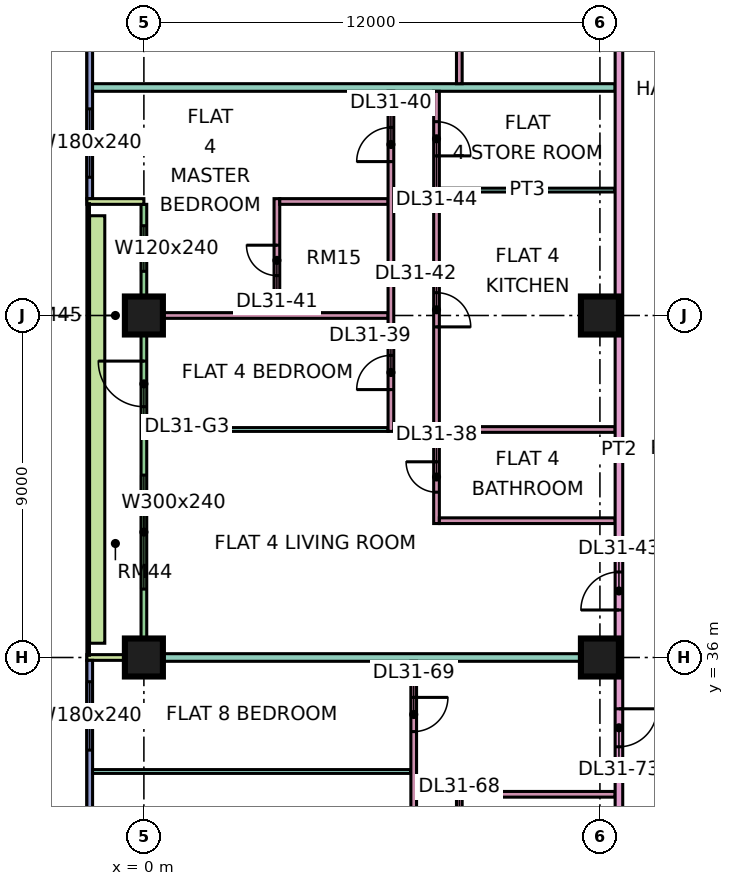
"""IFC4 building model, lengths in metres.
Left out: names, types, materials, properties, quantities, classifications, styles, units other than length and angle.
Written with IfcOpenShell. Run it as: python <this file> out.ifc"""

import sys

from ifc_helpers import new_model, si_unit, direction, frame, frame_2d, origin, origin_2d, place, context, subcontext, project, spatial, rectangle, extrude, element, fill, save


model = new_model("IFC4")
c1 = context("Model", 3, precision=1e-05, world=origin(), true_north=direction((0.0, 1.0)))
c2 = subcontext(c1, "Body", "Model", "MODEL_VIEW")
j1 = project(units=[si_unit("LENGTHUNIT", "METRE"), si_unit("PLANEANGLEUNIT", "RADIAN")], contexts=[c1])
p1 = place(None, origin())
s1 = spatial("IfcSite", under=j1, at=p1, CompositionType="ELEMENT")
p2 = place(p1, origin())
s2 = spatial("IfcBuilding", under=s1, at=p2, CompositionType="ELEMENT")
p3 = place(p2, frame((0.0, 0.0, 133.15)))
s3 = spatial("IfcBuildingStorey", under=s2, at=p3, CompositionType="ELEMENT", Elevation=133.15)
p4 = place(p3, frame((0.0, 36.0, 0.0), z_axis=(0.0, 0.0, 1.0), x_axis=(1.0, 0.0, 0.0)))
e1 = element("IfcColumn", 1, at=p4, inside=s3, PredefinedType="COLUMN", context=c2, shape_type="SweptSolid", body=[
    extrude(rectangle(XDim=1.0, YDim=1.0, at=origin_2d()), origin(), (0.0, 0.0, 1.0), 3.75),
])
for number, where, z_axis, x_axis in (
    (2, (0.0, 45.0, 0.0), (0.0, 0.0, 1.0), (1.0, 0.0, 0.0)),
    (3, (12.0, 36.0, 0.0), (0.0, 0.0, 1.0), (1.0, 0.0, 0.0)),
    (4, (12.0, 45.0, 0.0), (0.0, 0.0, 1.0), (1.0, 0.0, 0.0)),
):
    element("IfcColumn", number, at=place(p3, frame(where, z_axis=z_axis, x_axis=x_axis)), inside=s3, PredefinedType="COLUMN", context=c2, shape_type="SweptSolid", body=[
        extrude(rectangle(XDim=1.0, YDim=1.0, at=origin_2d()), origin(), (0.0, 0.0, 1.0), 3.75),
    ])
p5 = place(p3, frame((-1.425, 61.5, 0.0), z_axis=(0.0, 0.0, 1.0), x_axis=(0.0, -1.0, 0.0)))
e5 = element("IfcWall", 5, at=p5, inside=s3, PredefinedType="SOLIDWALL", context=c2, shape_type="SweptSolid", body=[
    extrude(rectangle(XDim=13.425, YDim=0.15, at=frame_2d((6.712, 0.0))), origin(), (0.0, 0.0, 1.0), 3.35),
])
p6 = place(p5, frame((0.75, 0.0, 0.45)))
e6 = element("IfcOpeningElement", 6, at=p6, cuts=e5, PredefinedType="OPENING", context=c2, shape_type="SweptSolid", body=[
    extrude(rectangle(XDim=3.0, YDim=2.4, at=frame_2d((1.5, 1.2))), frame((0.0, 0.085, 0.0), z_axis=(0.0, -1.0, 0.0), x_axis=(1.0, 0.0, 0.0)), (0.0, 0.0, 1.0), 0.17),
])
p7 = place(p5, frame((6.0, 0.0, 0.45)))
e7 = element("IfcOpeningElement", 7, at=p7, cuts=e5, PredefinedType="OPENING", context=c2, shape_type="SweptSolid", body=[
    extrude(rectangle(XDim=3.0, YDim=2.4, at=frame_2d((1.5, 1.2))), frame((0.0, 0.085, 0.0), z_axis=(0.0, -1.0, 0.0), x_axis=(1.0, 0.0, 0.0)), (0.0, 0.0, 1.0), 0.17),
])
p8 = place(p5, frame((11.062, 0.0, 0.45)))
e8 = element("IfcOpeningElement", 8, at=p8, cuts=e5, PredefinedType="OPENING", context=c2, shape_type="SweptSolid", body=[
    extrude(rectangle(XDim=1.8, YDim=2.4, at=frame_2d((0.9, 1.2))), frame((0.0, 0.085, 0.0), z_axis=(0.0, -1.0, 0.0), x_axis=(1.0, 0.0, 0.0)), (0.0, 0.0, 1.0), 0.17),
])
p9 = place(p3, frame((0.0, 47.925, 0.0), z_axis=(0.0, 0.0, 1.0), x_axis=(0.0, -1.0, 0.0)))
e9 = element("IfcWall", 9, at=p9, inside=s3, PredefinedType="SOLIDWALL", context=c2, shape_type="SweptSolid", body=[
    extrude(rectangle(XDim=11.85, YDim=0.15, at=frame_2d((5.925, 0.0))), origin(), (0.0, 0.0, 1.0), 3.35),
])
p10 = place(p9, frame((0.562, 0.0, 0.45)))
e10 = element("IfcOpeningElement", 10, at=p10, cuts=e9, PredefinedType="OPENING", context=c2, shape_type="SweptSolid", body=[
    extrude(rectangle(XDim=1.2, YDim=2.4, at=frame_2d((0.6, 1.2))), frame((0.0, 0.085, 0.0), z_axis=(0.0, -1.0, 0.0), x_axis=(1.0, 0.0, 0.0)), (0.0, 0.0, 1.0), 0.17),
])
p11 = place(p9, frame((4.125, 0.0, 0.0)))
e11 = element("IfcOpeningElement", 11, at=p11, cuts=e9, PredefinedType="OPENING", context=c2, shape_type="SweptSolid", body=[
    extrude(rectangle(XDim=1.2, YDim=2.4, at=frame_2d((0.6, 1.2))), frame((0.0, 0.085, 0.0), z_axis=(0.0, -1.0, 0.0), x_axis=(1.0, 0.0, 0.0)), (0.0, 0.0, 1.0), 0.17),
])
p12 = place(p9, frame((7.125, 0.0, 0.45)))
e12 = element("IfcOpeningElement", 12, at=p12, cuts=e9, PredefinedType="OPENING", context=c2, shape_type="SweptSolid", body=[
    extrude(rectangle(XDim=3.0, YDim=2.4, at=frame_2d((1.5, 1.2))), frame((0.0, 0.085, 0.0), z_axis=(0.0, -1.0, 0.0), x_axis=(1.0, 0.0, 0.0)), (0.0, 0.0, 1.0), 0.17),
])
for number, where, z_axis, x_axis in (
    (13, (-1.5, 48.0, 0.0), (0.0, 0.0, 1.0), (1.0, 0.0, 0.0)),
    (14, (-1.5, 36.0, 0.0), (0.0, 0.0, 1.0), (1.0, 0.0, 0.0)),
):
    element("IfcWall", number, at=place(p3, frame(where, z_axis=z_axis, x_axis=x_axis)), inside=s3, PredefinedType="SOLIDWALL", context=c2, shape_type="SweptSolid", body=[
        extrude(rectangle(XDim=1.5, YDim=0.15, at=frame_2d((0.75, 0.0))), origin(), (0.0, 0.0, 1.0), 3.35),
    ])
p13 = place(p3, frame((-1.425, 35.925, 0.0), z_axis=(0.0, 0.0, 1.0), x_axis=(0.0, -1.0, 0.0)))
e15 = element("IfcWall", 15, at=p13, inside=s3, PredefinedType="SOLIDWALL", context=c2, shape_type="SweptSolid", body=[
    extrude(rectangle(XDim=11.85, YDim=0.15, at=frame_2d((5.925, 0.0))), origin(), (0.0, 0.0, 1.0), 3.35),
])
p14 = place(p13, frame((0.562, 0.0, 0.45)))
e16 = element("IfcOpeningElement", 16, at=p14, cuts=e15, PredefinedType="OPENING", context=c2, shape_type="SweptSolid", body=[
    extrude(rectangle(XDim=1.8, YDim=2.4, at=frame_2d((0.9, 1.2))), frame((0.0, 0.085, 0.0), z_axis=(0.0, -1.0, 0.0), x_axis=(1.0, 0.0, 0.0)), (0.0, 0.0, 1.0), 0.17),
])
p15 = place(p13, frame((4.425, 0.0, 0.45)))
e17 = element("IfcOpeningElement", 17, at=p15, cuts=e15, PredefinedType="OPENING", context=c2, shape_type="SweptSolid", body=[
    extrude(rectangle(XDim=3.0, YDim=2.4, at=frame_2d((1.5, 1.2))), frame((0.0, 0.085, 0.0), z_axis=(0.0, -1.0, 0.0), x_axis=(1.0, 0.0, 0.0)), (0.0, 0.0, 1.0), 0.17),
])
p16 = place(p13, frame((9.488, 0.0, 0.45)))
e18 = element("IfcOpeningElement", 18, at=p16, cuts=e15, PredefinedType="OPENING", context=c2, shape_type="SweptSolid", body=[
    extrude(rectangle(XDim=1.8, YDim=2.4, at=frame_2d((0.9, 1.2))), frame((0.0, 0.085, 0.0), z_axis=(0.0, -1.0, 0.0), x_axis=(1.0, 0.0, 0.0)), (0.0, 0.0, 1.0), 0.17),
])
p17 = place(p3, frame((-1.229, 47.625, 0.0), z_axis=(0.0, 0.0, 1.0), x_axis=(0.0, -1.0, 0.0)))
e19 = element("IfcWall", 19, at=p17, inside=s3, PredefinedType="SOLIDWALL", context=c2, shape_type="SweptSolid", body=[
    extrude(rectangle(XDim=11.25, YDim=0.4, at=frame_2d((5.625, 0.0))), origin(), (0.0, 0.0, 1.0), 0.7),
])
p18 = place(p3, frame((-1.351, 33.0, 0.0), z_axis=(0.0, 0.0, 1.0), x_axis=(1.0, 0.0, 0.0)))
e20 = element("IfcWall", 20, at=p18, inside=s3, PredefinedType="PARTITIONING", context=c2, shape_type="SweptSolid", body=[
    extrude(rectangle(XDim=8.376, YDim=0.1, at=frame_2d((4.188, 0.0))), origin(), (0.0, 0.0, 1.0), 3.35),
])
e21 = element("IfcWall", 21, at=p4, inside=s3, PredefinedType="PARTITIONING", context=c2, shape_type="SweptSolid", body=[
    extrude(rectangle(XDim=12.4, YDim=0.2, at=frame_2d((6.2, 0.0))), origin(), (0.0, 0.0, 1.0), 3.35),
])
p19 = place(p3, frame((-1.35, 51.0, 0.0), z_axis=(0.0, 0.0, 1.0), x_axis=(1.0, 0.0, 0.0)))
e22 = element("IfcWall", 22, at=p19, inside=s3, PredefinedType="PARTITIONING", context=c2, shape_type="SweptSolid", body=[
    extrude(rectangle(XDim=13.75, YDim=0.2, at=frame_2d((6.875, 0.0))), origin(), (0.0, 0.0, 1.0), 3.35),
])
p20 = place(p3, frame((0.074, 42.0, 0.0), z_axis=(0.0, 0.0, 1.0), x_axis=(1.0, 0.0, 0.0)))
e23 = element("IfcWall", 23, at=p20, inside=s3, PredefinedType="PARTITIONING", context=c2, shape_type="SweptSolid", body=[
    extrude(rectangle(XDim=6.351, YDim=0.1, at=frame_2d((3.176, 0.0))), origin(), (0.0, 0.0, 1.0), 3.35),
])
p21 = place(p3, frame((0.074, 45.0, 0.0), z_axis=(0.0, 0.0, 1.0), x_axis=(1.0, 0.0, 0.0)))
e24 = element("IfcWall", 24, at=p21, inside=s3, PredefinedType="PARTITIONING", context=c2, shape_type="SweptSolid", body=[
    extrude(rectangle(XDim=6.351, YDim=0.15, at=frame_2d((3.176, 0.0))), origin(), (0.0, 0.0, 1.0), 3.35),
])
p22 = place(p3, frame((3.5, 45.075, 0.0), z_axis=(0.0, 0.0, 1.0), x_axis=(0.0, 1.0, 0.0)))
e25 = element("IfcWall", 25, at=p22, inside=s3, PredefinedType="PARTITIONING", context=c2, shape_type="SweptSolid", body=[
    extrude(rectangle(XDim=3.0, YDim=0.15, at=frame_2d((1.5, 0.0))), origin(), (0.0, 0.0, 1.0), 3.35),
])
p23 = place(p22, frame((0.975, 0.0, 0.0)))
e26 = element("IfcOpeningElement", 26, at=p23, cuts=e25, PredefinedType="OPENING", context=c2, shape_type="SweptSolid", body=[
    extrude(rectangle(XDim=0.8, YDim=2.1, at=frame_2d((0.4, 1.05))), frame((0.0, 0.085, 0.0), z_axis=(0.0, -1.0, 0.0), x_axis=(1.0, 0.0, 0.0)), (0.0, 0.0, 1.0), 0.17),
])
p24 = place(p3, frame((3.575, 48.0, 0.0), z_axis=(0.0, 0.0, 1.0), x_axis=(1.0, 0.0, 0.0)))
e27 = element("IfcWall", 27, at=p24, inside=s3, PredefinedType="PARTITIONING", context=c2, shape_type="SweptSolid", body=[
    extrude(rectangle(XDim=2.85, YDim=0.15, at=frame_2d((1.425, 0.0))), origin(), (0.0, 0.0, 1.0), 3.35),
])
p25 = place(p3, frame((6.5, 41.95, 0.0), z_axis=(0.0, 0.0, 1.0), x_axis=(0.0, 1.0, 0.0)))
e28 = element("IfcWall", 28, at=p25, inside=s3, PredefinedType="PARTITIONING", context=c2, shape_type="SweptSolid", body=[
    extrude(rectangle(XDim=8.95, YDim=0.15, at=frame_2d((4.475, 0.0))), origin(), (0.0, 0.0, 1.0), 3.35),
])
p26 = place(p25, frame((1.1, 0.0, 0.0)))
e29 = element("IfcOpeningElement", 29, at=p26, cuts=e28, PredefinedType="OPENING", context=c2, shape_type="SweptSolid", body=[
    extrude(rectangle(XDim=0.9, YDim=2.1, at=frame_2d((0.45, 1.05))), frame((0.0, 0.085, 0.0), z_axis=(0.0, -1.0, 0.0), x_axis=(1.0, 0.0, 0.0)), (0.0, 0.0, 1.0), 0.17),
])
p27 = place(p25, frame((7.1, 0.0, 0.0)))
e30 = element("IfcOpeningElement", 30, at=p27, cuts=e28, PredefinedType="OPENING", context=c2, shape_type="SweptSolid", body=[
    extrude(rectangle(XDim=0.9, YDim=2.1, at=frame_2d((0.45, 1.05))), frame((0.0, 0.085, 0.0), z_axis=(0.0, -1.0, 0.0), x_axis=(1.0, 0.0, 0.0)), (0.0, 0.0, 1.0), 0.17),
])
p28 = place(p3, frame((7.1, 26.925, 0.0), z_axis=(0.0, 0.0, 1.0), x_axis=(0.0, 1.0, 0.0)))
e31 = element("IfcWall", 31, at=p28, inside=s3, PredefinedType="PARTITIONING", context=c2, shape_type="SweptSolid", body=[
    extrude(rectangle(XDim=8.975, YDim=0.15, at=frame_2d((4.487, 0.0))), origin(), (0.0, 0.0, 1.0), 3.35),
])
p29 = place(p28, frame((7.125, 0.0, 0.0)))
e32 = element("IfcOpeningElement", 32, at=p29, cuts=e31, PredefinedType="OPENING", context=c2, shape_type="SweptSolid", body=[
    extrude(rectangle(XDim=0.9, YDim=2.1, at=frame_2d((0.45, 1.05))), frame((0.0, 0.085, 0.0), z_axis=(0.0, -1.0, 0.0), x_axis=(1.0, 0.0, 0.0)), (0.0, 0.0, 1.0), 0.17),
])
p30 = place(p28, frame((4.125, 0.0, 0.0)))
e33 = element("IfcOpeningElement", 33, at=p30, cuts=e31, PredefinedType="OPENING", context=c2, shape_type="SweptSolid", body=[
    extrude(rectangle(XDim=0.9, YDim=2.1, at=frame_2d((0.45, 1.05))), frame((0.0, 0.085, 0.0), z_axis=(0.0, -1.0, 0.0), x_axis=(1.0, 0.0, 0.0)), (0.0, 0.0, 1.0), 0.17),
])
p31 = place(p3, frame((7.7, 39.525, 0.0), z_axis=(0.0, 0.0, 1.0), x_axis=(0.0, 1.0, 0.0)))
e34 = element("IfcWall", 34, at=p31, inside=s3, PredefinedType="PARTITIONING", context=c2, shape_type="SweptSolid", body=[
    extrude(rectangle(XDim=11.375, YDim=0.15, at=frame_2d((5.688, 0.0))), origin(), (0.0, 0.0, 1.0), 3.35),
])
p32 = place(p31, frame((0.825, 0.0, 0.0)))
e35 = element("IfcOpeningElement", 35, at=p32, cuts=e34, PredefinedType="OPENING", context=c2, shape_type="SweptSolid", body=[
    extrude(rectangle(XDim=0.8, YDim=2.1, at=frame_2d((0.4, 1.05))), frame((0.0, 0.085, 0.0), z_axis=(0.0, -1.0, 0.0), x_axis=(1.0, 0.0, 0.0)), (0.0, 0.0, 1.0), 0.17),
])
p33 = place(p31, frame((5.175, 0.0, 0.0)))
e36 = element("IfcOpeningElement", 36, at=p33, cuts=e34, PredefinedType="OPENING", context=c2, shape_type="SweptSolid", body=[
    extrude(rectangle(XDim=0.9, YDim=2.1, at=frame_2d((0.45, 1.05))), frame((0.0, 0.085, 0.0), z_axis=(0.0, -1.0, 0.0), x_axis=(1.0, 0.0, 0.0)), (0.0, 0.0, 1.0), 0.17),
])
p34 = place(p31, frame((9.675, 0.0, 0.0)))
e37 = element("IfcOpeningElement", 37, at=p34, cuts=e34, PredefinedType="OPENING", context=c2, shape_type="SweptSolid", body=[
    extrude(rectangle(XDim=0.9, YDim=2.1, at=frame_2d((0.45, 1.05))), frame((0.0, 0.085, 0.0), z_axis=(0.0, -1.0, 0.0), x_axis=(1.0, 0.0, 0.0)), (0.0, 0.0, 1.0), 0.17),
])
for number, where, z_axis, x_axis in (
    (38, (7.775, 39.6, 0.0), (0.0, 0.0, 1.0), (1.0, 0.0, 0.0)),
    (39, (7.775, 42.0, 0.0), (0.0, 0.0, 1.0), (1.0, 0.0, 0.0)),
):
    element("IfcWall", number, at=place(p3, frame(where, z_axis=z_axis, x_axis=x_axis)), inside=s3, PredefinedType="PARTITIONING", context=c2, shape_type="SweptSolid", body=[
        extrude(rectangle(XDim=4.625, YDim=0.15, at=frame_2d((2.312, 0.0))), origin(), (0.0, 0.0, 1.0), 3.35),
    ])
p35 = place(p3, frame((7.775, 48.3, 0.0), z_axis=(0.0, 0.0, 1.0), x_axis=(1.0, 0.0, 0.0)))
e40 = element("IfcWall", 40, at=p35, inside=s3, PredefinedType="PARTITIONING", context=c2, shape_type="SweptSolid", body=[
    extrude(rectangle(XDim=4.625, YDim=0.1, at=frame_2d((2.312, 0.0))), origin(), (0.0, 0.0, 1.0), 3.35),
])
p36 = place(p3, frame((8.3, 22.5, 0.0), z_axis=(0.0, 0.0, 1.0), x_axis=(0.0, 1.0, 0.0)))
e41 = element("IfcWall", 41, at=p36, inside=s3, PredefinedType="PARTITIONING", context=c2, shape_type="SweptSolid", body=[
    extrude(rectangle(XDim=9.975, YDim=0.15, at=frame_2d((4.988, 0.0))), origin(), (0.0, 0.0, 1.0), 3.35),
])
p37 = place(p36, frame((8.1, 0.0, 0.0)))
e42 = element("IfcOpeningElement", 42, at=p37, cuts=e41, PredefinedType="OPENING", context=c2, shape_type="SweptSolid", body=[
    extrude(rectangle(XDim=0.8, YDim=2.1, at=frame_2d((0.4, 1.05))), frame((0.0, 0.085, 0.0), z_axis=(0.0, -1.0, 0.0), x_axis=(1.0, 0.0, 0.0)), (0.0, 0.0, 1.0), 0.17),
])
p38 = place(p36, frame((3.05, 0.0, 0.0)))
e43 = element("IfcOpeningElement", 43, at=p38, cuts=e41, PredefinedType="OPENING", context=c2, shape_type="SweptSolid", body=[
    extrude(rectangle(XDim=0.9, YDim=2.1, at=frame_2d((0.45, 1.05))), frame((0.0, 0.085, 0.0), z_axis=(0.0, -1.0, 0.0), x_axis=(1.0, 0.0, 0.0)), (0.0, 0.0, 1.0), 0.17),
])
p39 = place(p3, frame((8.3, 51.1, 0.0), z_axis=(0.0, 0.0, 1.0), x_axis=(0.0, 1.0, 0.0)))
e44 = element("IfcWall", 44, at=p39, inside=s3, PredefinedType="PARTITIONING", context=c2, shape_type="SweptSolid", body=[
    extrude(rectangle(XDim=8.675, YDim=0.15, at=frame_2d((4.337, 0.0))), origin(), (0.0, 0.0, 1.0), 3.35),
])
p40 = place(p39, frame((2.15, 0.0, 0.0)))
e45 = element("IfcOpeningElement", 45, at=p40, cuts=e44, PredefinedType="OPENING", context=c2, shape_type="SweptSolid", body=[
    extrude(rectangle(XDim=0.9, YDim=2.1, at=frame_2d((0.45, 1.05))), frame((0.0, 0.085, 0.0), z_axis=(0.0, -1.0, 0.0), x_axis=(1.0, 0.0, 0.0)), (0.0, 0.0, 1.0), 0.17),
])
p41 = place(p3, frame((8.375, 32.4, 0.0), z_axis=(0.0, 0.0, 1.0), x_axis=(1.0, 0.0, 0.0)))
e46 = element("IfcWall", 46, at=p41, inside=s3, PredefinedType="PARTITIONING", context=c2, shape_type="SweptSolid", body=[
    extrude(rectangle(XDim=4.025, YDim=0.15, at=frame_2d((2.012, 0.0))), origin(), (0.0, 0.0, 1.0), 3.35),
])
p42 = place(p3, frame((12.5, 20.0, 0.0), z_axis=(0.0, 0.0, 1.0), x_axis=(0.0, 1.0, 0.0)))
e47 = element("IfcWall", 47, at=p42, inside=s3, PredefinedType="PARTITIONING", context=c2, shape_type="SweptSolid", body=[
    extrude(rectangle(XDim=42.926, YDim=0.2, at=frame_2d((21.463, 0.0))), origin(), (0.0, 0.0, 1.0), 3.35),
])
p43 = place(p42, frame((17.25, 0.0, 0.0)))
e48 = element("IfcOpeningElement", 48, at=p43, cuts=e47, PredefinedType="OPENING", context=c2, shape_type="SweptSolid", body=[
    extrude(rectangle(XDim=1.0, YDim=2.1, at=frame_2d((0.5, 1.05))), frame((0.0, 0.11, 0.0), z_axis=(0.0, -1.0, 0.0), x_axis=(1.0, 0.0, 0.0)), (0.0, 0.0, 1.0), 0.22),
])
p44 = place(p42, frame((40.8, 0.0, 0.0)))
e49 = element("IfcOpeningElement", 49, at=p44, cuts=e47, PredefinedType="OPENING", context=c2, shape_type="SweptSolid", body=[
    extrude(rectangle(XDim=1.0, YDim=2.1, at=frame_2d((0.5, 1.05))), frame((0.0, 0.11, 0.0), z_axis=(0.0, -1.0, 0.0), x_axis=(1.0, 0.0, 0.0)), (0.0, 0.0, 1.0), 0.22),
])
p45 = place(p42, frame((0.6, 0.0, 0.0)))
e50 = element("IfcOpeningElement", 50, at=p45, cuts=e47, PredefinedType="OPENING", context=c2, shape_type="SweptSolid", body=[
    extrude(rectangle(XDim=1.2, YDim=2.1, at=frame_2d((0.6, 1.05))), frame((0.0, 0.11, 0.0), z_axis=(0.0, -1.0, 0.0), x_axis=(1.0, 0.0, 0.0)), (0.0, 0.0, 1.0), 0.22),
])
p46 = place(p42, frame((13.65, 0.0, 0.0)))
e51 = element("IfcOpeningElement", 51, at=p46, cuts=e47, PredefinedType="OPENING", context=c2, shape_type="SweptSolid", body=[
    extrude(rectangle(XDim=1.0, YDim=2.1, at=frame_2d((0.5, 1.05))), frame((0.0, 0.11, 0.0), z_axis=(0.0, -1.0, 0.0), x_axis=(1.0, 0.0, 0.0)), (0.0, 0.0, 1.0), 0.22),
])
p47 = place(p8, origin())
e52 = element("IfcWindow", 52, at=p47, inside=s3, PartitioningType="SINGLE_PANEL", PredefinedType="WINDOW", context=c2, shape_type="SweptSolid", body=[
    extrude(rectangle(XDim=1.8, YDim=2.4, at=frame_2d((0.9, 1.2))), frame((0.0, 0.03, 0.0), z_axis=(0.0, -1.0, 0.0), x_axis=(1.0, 0.0, 0.0)), (0.0, 0.0, 1.0), 0.06),
])
fill(e8, e52)
p48 = place(p10, origin())
e53 = element("IfcWindow", 53, at=p48, inside=s3, PartitioningType="SINGLE_PANEL", PredefinedType="WINDOW", context=c2, shape_type="SweptSolid", body=[
    extrude(rectangle(XDim=1.2, YDim=2.4, at=frame_2d((0.6, 1.2))), frame((0.0, 0.03, 0.0), z_axis=(0.0, -1.0, 0.0), x_axis=(1.0, 0.0, 0.0)), (0.0, 0.0, 1.0), 0.06),
])
fill(e10, e53)
p49 = place(p11, frame((1.2, 0.0, 0.0), z_axis=(0.0, 0.0, 1.0), x_axis=(-1.0, 0.0, 0.0)))
e54 = element("IfcDoor", 54, at=p49, inside=s3, OperationType="DOUBLE_DOOR_SINGLE_SWING", PredefinedType="DOOR", context=c2, shape_type="SweptSolid", body=[
    extrude(rectangle(XDim=1.2, YDim=2.4, at=frame_2d((0.6, 1.2))), frame((0.0, 0.025, 0.0), z_axis=(0.0, -1.0, 0.0), x_axis=(1.0, 0.0, 0.0)), (0.0, 0.0, 1.0), 0.05),
])
fill(e11, e54)
p50 = place(p12, origin())
e55 = element("IfcWindow", 55, at=p50, inside=s3, PartitioningType="SINGLE_PANEL", PredefinedType="WINDOW", context=c2, shape_type="SweptSolid", body=[
    extrude(rectangle(XDim=3.0, YDim=2.4, at=frame_2d((1.5, 1.2))), frame((0.0, 0.03, 0.0), z_axis=(0.0, -1.0, 0.0), x_axis=(1.0, 0.0, 0.0)), (0.0, 0.0, 1.0), 0.06),
])
fill(e12, e55)
p51 = place(p14, origin())
e56 = element("IfcWindow", 56, at=p51, inside=s3, PartitioningType="SINGLE_PANEL", PredefinedType="WINDOW", context=c2, shape_type="SweptSolid", body=[
    extrude(rectangle(XDim=1.8, YDim=2.4, at=frame_2d((0.9, 1.2))), frame((0.0, 0.03, 0.0), z_axis=(0.0, -1.0, 0.0), x_axis=(1.0, 0.0, 0.0)), (0.0, 0.0, 1.0), 0.06),
])
fill(e16, e56)
p52 = place(p32, frame((0.8, 0.0, 0.0), z_axis=(0.0, 0.0, 1.0), x_axis=(-1.0, 0.0, 0.0)))
e57 = element("IfcDoor", 57, at=p52, inside=s3, OperationType="SINGLE_SWING_RIGHT", PredefinedType="DOOR", context=c2, shape_type="SweptSolid", body=[
    extrude(rectangle(XDim=0.8, YDim=2.1, at=frame_2d((0.4, 1.05))), frame((0.0, 0.025, 0.0), z_axis=(0.0, -1.0, 0.0), x_axis=(1.0, 0.0, 0.0)), (0.0, 0.0, 1.0), 0.05),
])
fill(e35, e57)
p53 = place(p26, origin())
e58 = element("IfcDoor", 58, at=p53, inside=s3, OperationType="SINGLE_SWING_LEFT", PredefinedType="DOOR", context=c2, shape_type="SweptSolid", body=[
    extrude(rectangle(XDim=0.9, YDim=2.1, at=frame_2d((0.45, 1.05))), frame((0.0, 0.025, 0.0), z_axis=(0.0, -1.0, 0.0), x_axis=(1.0, 0.0, 0.0)), (0.0, 0.0, 1.0), 0.05),
])
fill(e29, e58)
p54 = place(p27, origin())
e59 = element("IfcDoor", 59, at=p54, inside=s3, OperationType="SINGLE_SWING_LEFT", PredefinedType="DOOR", context=c2, shape_type="SweptSolid", body=[
    extrude(rectangle(XDim=0.9, YDim=2.1, at=frame_2d((0.45, 1.05))), frame((0.0, 0.025, 0.0), z_axis=(0.0, -1.0, 0.0), x_axis=(1.0, 0.0, 0.0)), (0.0, 0.0, 1.0), 0.05),
])
fill(e30, e59)
p55 = place(p23, frame((0.8, 0.0, 0.0), z_axis=(0.0, 0.0, 1.0), x_axis=(-1.0, 0.0, 0.0)))
e60 = element("IfcDoor", 60, at=p55, inside=s3, OperationType="SINGLE_SWING_RIGHT", PredefinedType="DOOR", context=c2, shape_type="SweptSolid", body=[
    extrude(rectangle(XDim=0.8, YDim=2.1, at=frame_2d((0.4, 1.05))), frame((0.0, 0.025, 0.0), z_axis=(0.0, -1.0, 0.0), x_axis=(1.0, 0.0, 0.0)), (0.0, 0.0, 1.0), 0.05),
])
fill(e26, e60)
p56 = place(p33, frame((0.9, 0.0, 0.0), z_axis=(0.0, 0.0, 1.0), x_axis=(-1.0, 0.0, 0.0)))
e61 = element("IfcDoor", 61, at=p56, inside=s3, OperationType="SINGLE_SWING_LEFT", PredefinedType="DOOR", context=c2, shape_type="SweptSolid", body=[
    extrude(rectangle(XDim=0.9, YDim=2.1, at=frame_2d((0.45, 1.05))), frame((0.0, 0.025, 0.0), z_axis=(0.0, -1.0, 0.0), x_axis=(1.0, 0.0, 0.0)), (0.0, 0.0, 1.0), 0.05),
])
fill(e36, e61)
p57 = place(p43, origin())
e62 = element("IfcDoor", 62, at=p57, inside=s3, OperationType="SINGLE_SWING_LEFT", PredefinedType="DOOR", context=c2, shape_type="SweptSolid", body=[
    extrude(rectangle(XDim=1.0, YDim=2.1, at=frame_2d((0.5, 1.05))), frame((0.0, 0.025, 0.0), z_axis=(0.0, -1.0, 0.0), x_axis=(1.0, 0.0, 0.0)), (0.0, 0.0, 1.0), 0.05),
])
fill(e48, e62)
p58 = place(p34, frame((0.9, 0.0, 0.0), z_axis=(0.0, 0.0, 1.0), x_axis=(-1.0, 0.0, 0.0)))
e63 = element("IfcDoor", 63, at=p58, inside=s3, OperationType="SINGLE_SWING_LEFT", PredefinedType="DOOR", context=c2, shape_type="SweptSolid", body=[
    extrude(rectangle(XDim=0.9, YDim=2.1, at=frame_2d((0.45, 1.05))), frame((0.0, 0.025, 0.0), z_axis=(0.0, -1.0, 0.0), x_axis=(1.0, 0.0, 0.0)), (0.0, 0.0, 1.0), 0.05),
])
fill(e37, e63)
p59 = place(p29, origin())
e64 = element("IfcDoor", 64, at=p59, inside=s3, OperationType="SINGLE_SWING_RIGHT", PredefinedType="DOOR", context=c2, shape_type="SweptSolid", body=[
    extrude(rectangle(XDim=0.9, YDim=2.1, at=frame_2d((0.45, 1.05))), frame((0.0, 0.025, 0.0), z_axis=(0.0, -1.0, 0.0), x_axis=(1.0, 0.0, 0.0)), (0.0, 0.0, 1.0), 0.05),
])
fill(e32, e64)
p60 = place(p46, origin())
e65 = element("IfcDoor", 65, at=p60, inside=s3, OperationType="SINGLE_SWING_RIGHT", PredefinedType="DOOR", context=c2, shape_type="SweptSolid", body=[
    extrude(rectangle(XDim=1.0, YDim=2.1, at=frame_2d((0.5, 1.05))), frame((0.0, 0.025, 0.0), z_axis=(0.0, -1.0, 0.0), x_axis=(1.0, 0.0, 0.0)), (0.0, 0.0, 1.0), 0.05),
])
fill(e51, e65)
save(model, sys.argv[1])
